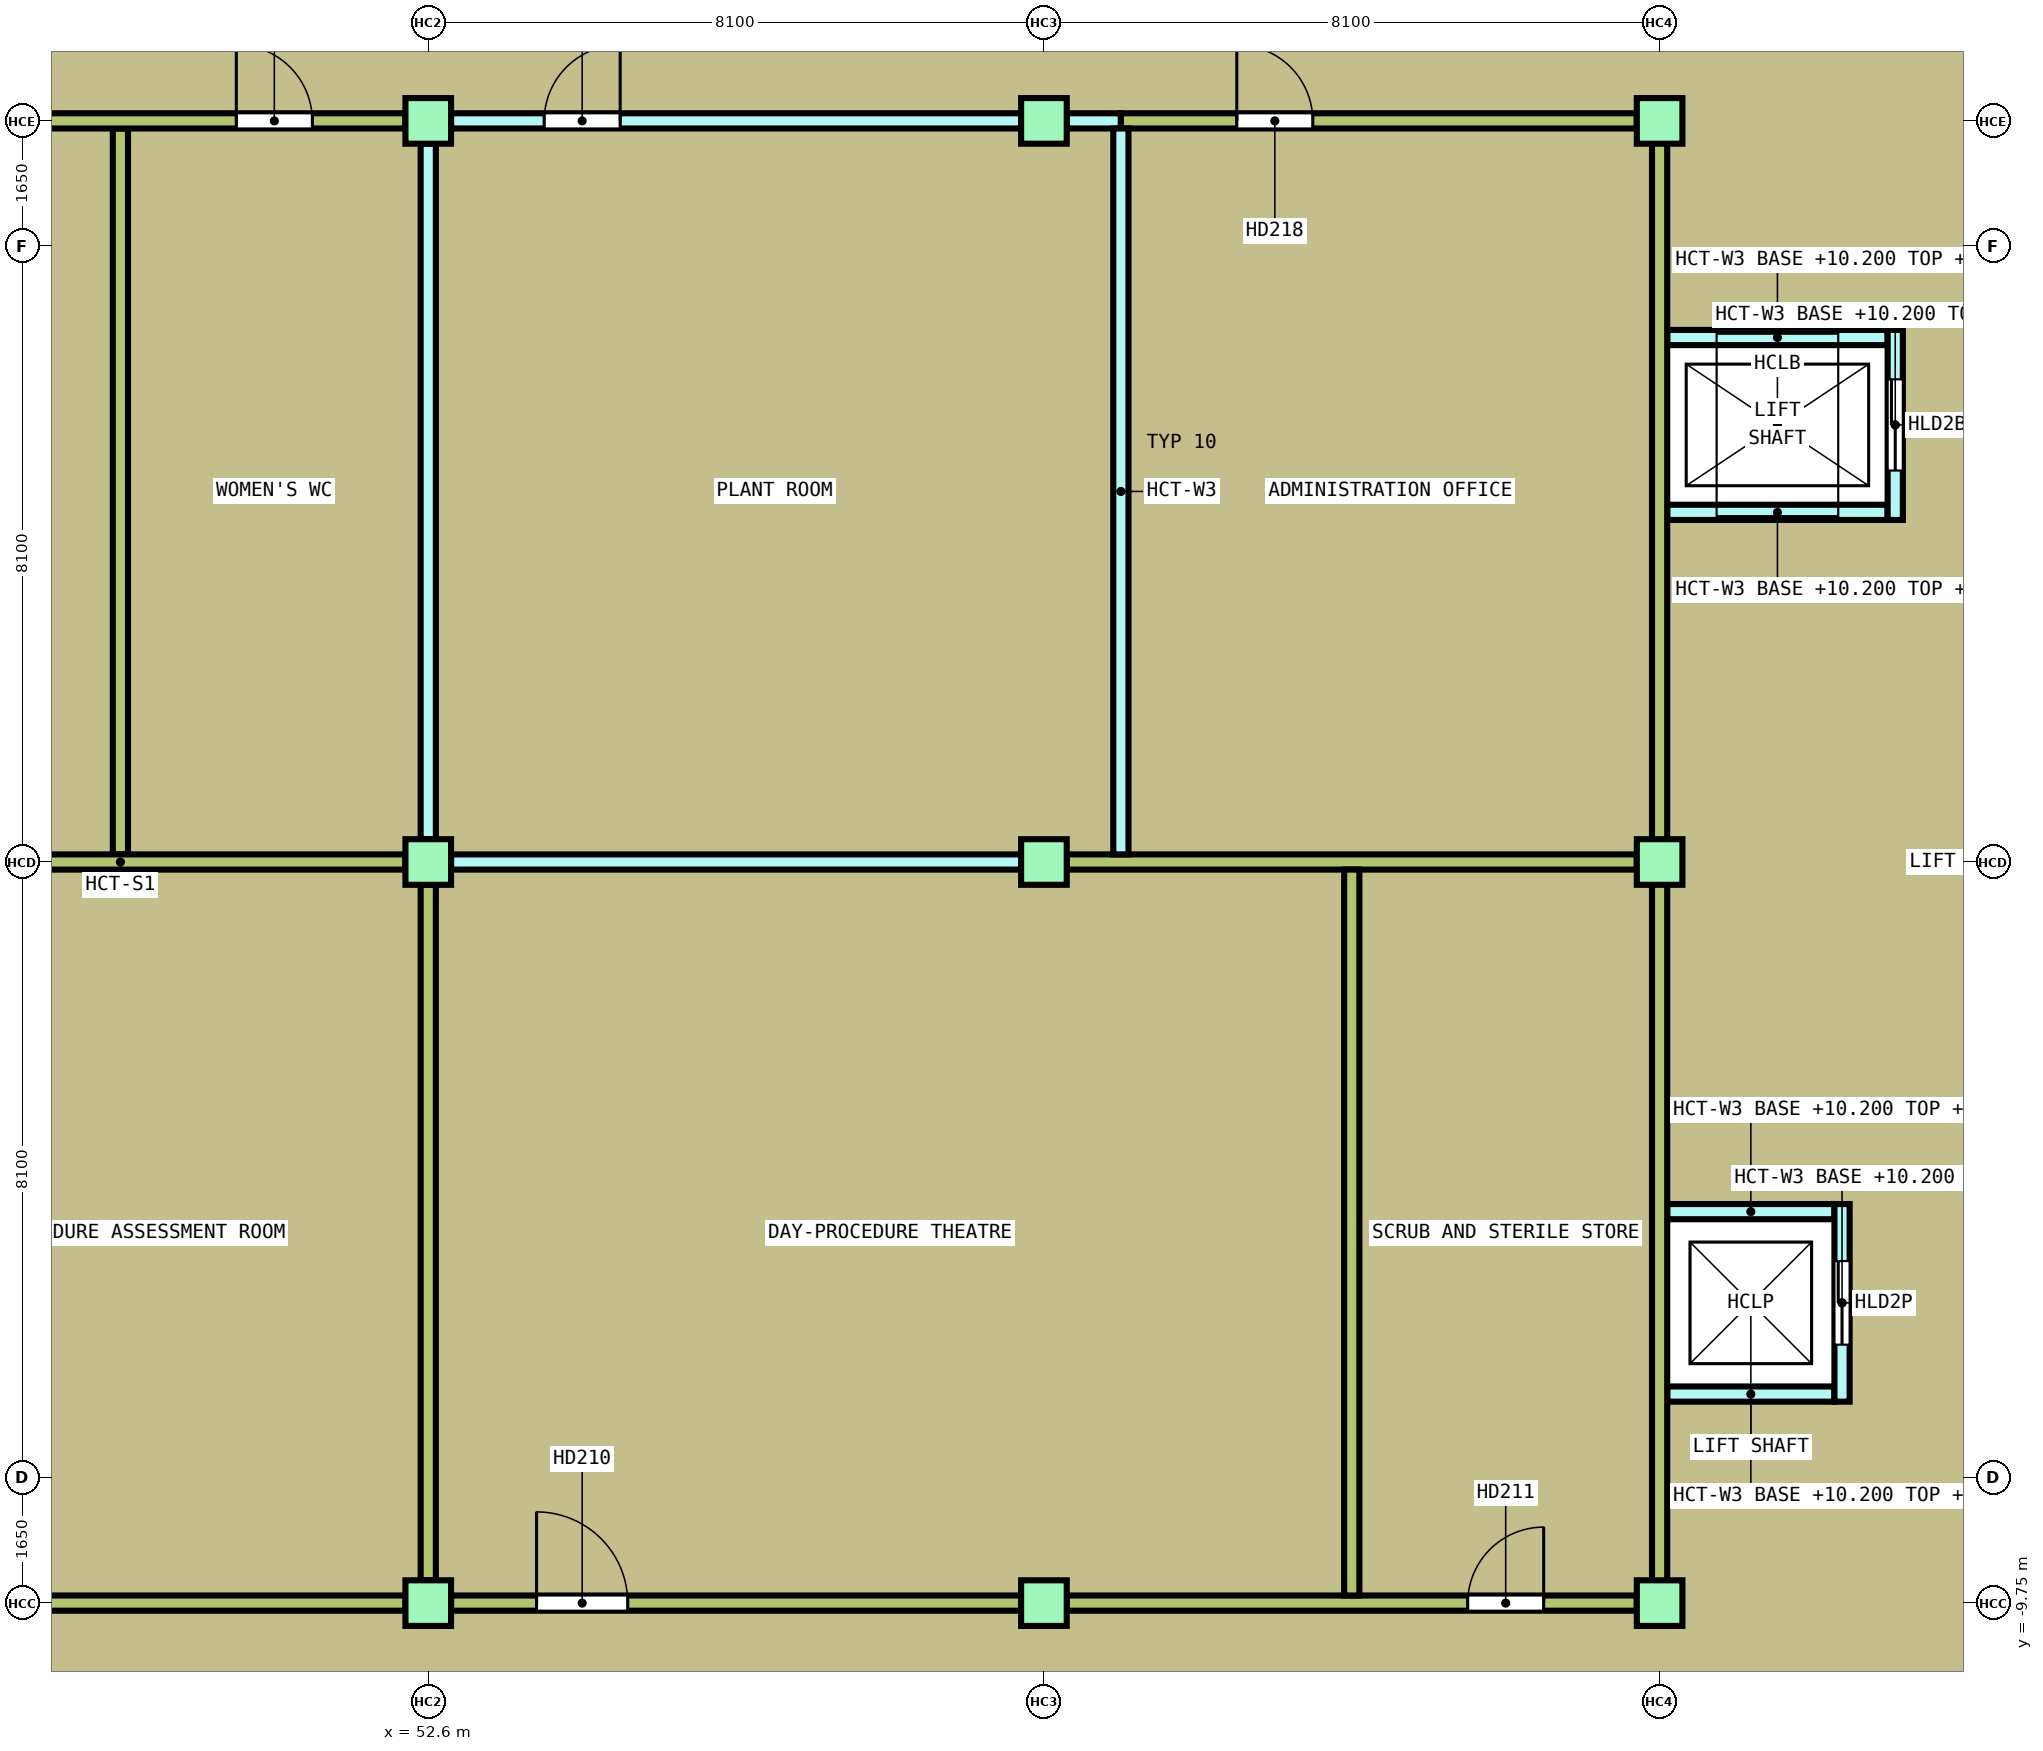
"""IFC4 building model, lengths in metres.
Left out: names, types, materials, properties, quantities, classifications, styles, units other than length and angle.
Written with IfcOpenShell. Run it as: python <this file> out.ifc"""

import sys

from ifc_helpers import new_model, si_unit, direction, frame, frame_2d, origin, origin_2d, place, context, subcontext, project, spatial, rectangle, extrude, element, fill, save


model = new_model("IFC4")
c1 = context("Model", 3, precision=1e-05, world=origin(), true_north=direction((0.0, 1.0)))
c2 = subcontext(c1, "Body", "Model", "MODEL_VIEW")
j1 = project(units=[si_unit("LENGTHUNIT", "METRE"), si_unit("PLANEANGLEUNIT", "RADIAN")], contexts=[c1])
p1 = place(None, origin())
s1 = spatial("IfcSite", under=j1, at=p1, CompositionType="ELEMENT")
p2 = place(p1, origin())
s2 = spatial("IfcBuilding", under=s1, at=p2, CompositionType="ELEMENT")
p3 = place(p2, frame((0.0, 0.0, 10.2)))
s3 = spatial("IfcBuildingStorey", under=s2, at=p3, CompositionType="ELEMENT", Elevation=10.2)
for number, where, z_axis, x_axis in (
    (1, (52.6, -9.75, 0.0), (0.0, 0.0, 1.0), (1.0, 0.0, 0.0)),
    (2, (60.7, -9.75, 0.0), (0.0, 0.0, 1.0), (1.0, 0.0, 0.0)),
    (3, (68.8, -9.75, 0.0), (0.0, 0.0, 1.0), (1.0, 0.0, 0.0)),
    (4, (52.6, 0.0, 0.0), (0.0, 0.0, 1.0), (1.0, 0.0, 0.0)),
    (5, (60.7, 0.0, 0.0), (0.0, 0.0, 1.0), (1.0, 0.0, 0.0)),
    (6, (68.8, 0.0, 0.0), (0.0, 0.0, 1.0), (1.0, 0.0, 0.0)),
    (7, (52.6, 9.75, 0.0), (0.0, 0.0, 1.0), (1.0, 0.0, 0.0)),
    (8, (60.7, 9.75, 0.0), (0.0, 0.0, 1.0), (1.0, 0.0, 0.0)),
    (9, (68.8, 9.75, 0.0), (0.0, 0.0, 1.0), (1.0, 0.0, 0.0)),
):
    element("IfcColumn", number, at=place(p3, frame(where, z_axis=z_axis, x_axis=x_axis)), inside=s3, PredefinedType="COLUMN", context=c2, shape_type="SweptSolid", body=[
        extrude(rectangle(XDim=0.6, YDim=0.6, at=origin_2d()), origin(), (0.0, 0.0, 1.0), 4.15),
    ])
for number, where, z_axis, x_axis in (
    (10, (68.9, -7.0, 0.0), (0.0, 0.0, 1.0), (1.0, 0.0, 0.0)),
    (11, (68.9, -4.6, 0.0), (0.0, 0.0, 1.0), (1.0, 0.0, 0.0)),
):
    element("IfcWall", number, at=place(p3, frame(where, z_axis=z_axis, x_axis=x_axis)), inside=s3, PredefinedType="SOLIDWALL", context=c2, shape_type="SweptSolid", body=[
        extrude(rectangle(XDim=2.2, YDim=0.2, at=frame_2d((1.1, 0.0))), origin(), (0.0, 0.0, 1.0), 4.15),
    ])
p4 = place(p3, frame((71.2, -7.1, 0.0), z_axis=(0.0, 0.0, 1.0), x_axis=(0.0, 1.0, 0.0)))
e12 = element("IfcWall", 12, at=p4, inside=s3, PredefinedType="SOLIDWALL", context=c2, shape_type="SweptSolid", body=[
    extrude(rectangle(XDim=2.6, YDim=0.2, at=frame_2d((1.3, 0.0))), origin(), (0.0, 0.0, 1.0), 4.15),
])
p5 = place(p4, frame((0.75, 0.0, 0.0)))
e13 = element("IfcOpeningElement", 13, at=p5, cuts=e12, PredefinedType="OPENING", context=c2, shape_type="SweptSolid", body=[
    extrude(rectangle(XDim=1.1, YDim=2.1, at=frame_2d((0.55, 1.05))), frame((0.0, 0.11, 0.0), z_axis=(0.0, -1.0, 0.0), x_axis=(1.0, 0.0, 0.0)), (0.0, 0.0, 1.0), 0.22),
])
for number, where, z_axis, x_axis in (
    (14, (68.9, 4.6, 0.0), (0.0, 0.0, 1.0), (1.0, 0.0, 0.0)),
    (15, (68.9, 6.9, 0.0), (0.0, 0.0, 1.0), (1.0, 0.0, 0.0)),
):
    element("IfcWall", number, at=place(p3, frame(where, z_axis=z_axis, x_axis=x_axis)), inside=s3, PredefinedType="SOLIDWALL", context=c2, shape_type="SweptSolid", body=[
        extrude(rectangle(XDim=2.9, YDim=0.2, at=frame_2d((1.45, 0.0))), origin(), (0.0, 0.0, 1.0), 4.15),
    ])
p6 = place(p3, frame((71.9, 4.5, 0.0), z_axis=(0.0, 0.0, 1.0), x_axis=(0.0, 1.0, 0.0)))
e16 = element("IfcWall", 16, at=p6, inside=s3, PredefinedType="SOLIDWALL", context=c2, shape_type="SweptSolid", body=[
    extrude(rectangle(XDim=2.5, YDim=0.2, at=frame_2d((1.25, 0.0))), origin(), (0.0, 0.0, 1.0), 4.15),
])
p7 = place(p6, frame((0.65, 0.0, 0.0)))
e17 = element("IfcOpeningElement", 17, at=p7, cuts=e16, PredefinedType="OPENING", context=c2, shape_type="SweptSolid", body=[
    extrude(rectangle(XDim=1.2, YDim=2.1, at=frame_2d((0.6, 1.05))), frame((0.0, 0.11, 0.0), z_axis=(0.0, -1.0, 0.0), x_axis=(1.0, 0.0, 0.0)), (0.0, 0.0, 1.0), 0.22),
])
p8 = place(p3, frame((48.55, 0.1, 0.0), z_axis=(0.0, 0.0, 1.0), x_axis=(0.0, 1.0, 0.0)))
e18 = element("IfcWall", 18, at=p8, inside=s3, PredefinedType="PARTITIONING", context=c2, shape_type="SweptSolid", body=[
    extrude(rectangle(XDim=9.55, YDim=0.2, at=frame_2d((4.775, 0.0))), origin(), (0.0, 0.0, 1.0), 3.6),
])
p9 = place(p3, frame((68.8, -9.75, 0.0), z_axis=(0.0, 0.0, 1.0), x_axis=(0.0, 1.0, 0.0)))
e19 = element("IfcWall", 19, at=p9, inside=s3, PredefinedType="PARTITIONING", context=c2, shape_type="SweptSolid", body=[
    extrude(rectangle(XDim=19.5, YDim=0.2, at=frame_2d((9.75, 0.0))), origin(), (0.0, 0.0, 1.0), 3.6),
])
p10 = place(p3, frame((44.8, -9.75, 0.0), z_axis=(0.0, 0.0, 1.0), x_axis=(1.0, 0.0, 0.0)))
e20 = element("IfcWall", 20, at=p10, inside=s3, PredefinedType="PARTITIONING", context=c2, shape_type="SweptSolid", body=[
    extrude(rectangle(XDim=7.5, YDim=0.2, at=frame_2d((3.75, 0.0))), origin(), (0.0, 0.0, 1.0), 3.6),
])
p11 = place(p10, frame((1.125, 0.0, 0.0)))
e21 = element("IfcOpeningElement", 21, at=p11, cuts=e20, PredefinedType="OPENING", context=c2, shape_type="SweptSolid", body=[
    extrude(rectangle(XDim=1.2, YDim=2.1, at=frame_2d((0.6, 1.05))), frame((0.0, 0.11, 0.0), z_axis=(0.0, -1.0, 0.0), x_axis=(1.0, 0.0, 0.0)), (0.0, 0.0, 1.0), 0.22),
])
p12 = place(p3, frame((52.9, -9.75, 0.0), z_axis=(0.0, 0.0, 1.0), x_axis=(1.0, 0.0, 0.0)))
e22 = element("IfcWall", 22, at=p12, inside=s3, PredefinedType="PARTITIONING", context=c2, shape_type="SweptSolid", body=[
    extrude(rectangle(XDim=7.5, YDim=0.2, at=frame_2d((3.75, 0.0))), origin(), (0.0, 0.0, 1.0), 3.6),
])
p13 = place(p12, frame((1.125, 0.0, 0.0)))
e23 = element("IfcOpeningElement", 23, at=p13, cuts=e22, PredefinedType="OPENING", context=c2, shape_type="SweptSolid", body=[
    extrude(rectangle(XDim=1.2, YDim=2.1, at=frame_2d((0.6, 1.05))), frame((0.0, 0.11, 0.0), z_axis=(0.0, -1.0, 0.0), x_axis=(1.0, 0.0, 0.0)), (0.0, 0.0, 1.0), 0.22),
])
p14 = place(p3, frame((61.0, -9.75, 0.0), z_axis=(0.0, 0.0, 1.0), x_axis=(1.0, 0.0, 0.0)))
e24 = element("IfcWall", 24, at=p14, inside=s3, PredefinedType="PARTITIONING", context=c2, shape_type="SweptSolid", body=[
    extrude(rectangle(XDim=7.5, YDim=0.2, at=frame_2d((3.75, 0.0))), origin(), (0.0, 0.0, 1.0), 3.6),
])
p15 = place(p14, frame((5.275, 0.0, 0.0)))
e25 = element("IfcOpeningElement", 25, at=p15, cuts=e24, PredefinedType="OPENING", context=c2, shape_type="SweptSolid", body=[
    extrude(rectangle(XDim=1.0, YDim=2.1, at=frame_2d((0.5, 1.05))), frame((0.0, 0.11, 0.0), z_axis=(0.0, -1.0, 0.0), x_axis=(1.0, 0.0, 0.0)), (0.0, 0.0, 1.0), 0.22),
])
p16 = place(p3, frame((44.8, 0.0, 0.0), z_axis=(0.0, 0.0, 1.0), x_axis=(1.0, 0.0, 0.0)))
e26 = element("IfcWall", 26, at=p16, inside=s3, PredefinedType="PARTITIONING", context=c2, shape_type="SweptSolid", body=[
    extrude(rectangle(XDim=7.5, YDim=0.2, at=frame_2d((3.75, 0.0))), origin(), (0.0, 0.0, 1.0), 3.6),
])
p17 = place(p3, frame((52.9, 0.0, 0.0), z_axis=(0.0, 0.0, 1.0), x_axis=(1.0, 0.0, 0.0)))
e27 = element("IfcWall", 27, at=p17, inside=s3, PredefinedType="SOLIDWALL", context=c2, shape_type="SweptSolid", body=[
    extrude(rectangle(XDim=7.5, YDim=0.2, at=frame_2d((3.75, 0.0))), origin(), (0.0, 0.0, 1.0), 3.6),
])
p18 = place(p3, frame((61.0, 0.0, 0.0), z_axis=(0.0, 0.0, 1.0), x_axis=(1.0, 0.0, 0.0)))
e28 = element("IfcWall", 28, at=p18, inside=s3, PredefinedType="PARTITIONING", context=c2, shape_type="SweptSolid", body=[
    extrude(rectangle(XDim=7.5, YDim=0.2, at=frame_2d((3.75, 0.0))), origin(), (0.0, 0.0, 1.0), 3.6),
])
p19 = place(p3, frame((52.6, -9.45, 0.0), z_axis=(0.0, 0.0, 1.0), x_axis=(0.0, 1.0, 0.0)))
e29 = element("IfcWall", 29, at=p19, inside=s3, PredefinedType="PARTITIONING", context=c2, shape_type="SweptSolid", body=[
    extrude(rectangle(XDim=9.15, YDim=0.2, at=frame_2d((4.575, 0.0))), origin(), (0.0, 0.0, 1.0), 3.6),
])
p20 = place(p3, frame((52.6, 0.3, 0.0), z_axis=(0.0, 0.0, 1.0), x_axis=(0.0, 1.0, 0.0)))
e30 = element("IfcWall", 30, at=p20, inside=s3, PredefinedType="SOLIDWALL", context=c2, shape_type="SweptSolid", body=[
    extrude(rectangle(XDim=9.15, YDim=0.2, at=frame_2d((4.575, 0.0))), origin(), (0.0, 0.0, 1.0), 3.6),
])
p21 = place(p3, frame((64.75, -9.65, 0.0), z_axis=(0.0, 0.0, 1.0), x_axis=(0.0, 1.0, 0.0)))
e31 = element("IfcWall", 31, at=p21, inside=s3, PredefinedType="PARTITIONING", context=c2, shape_type="SweptSolid", body=[
    extrude(rectangle(XDim=9.55, YDim=0.2, at=frame_2d((4.775, 0.0))), origin(), (0.0, 0.0, 1.0), 3.6),
])
p22 = place(p3, frame((44.8, 9.75, 0.0), z_axis=(0.0, 0.0, 1.0), x_axis=(1.0, 0.0, 0.0)))
e32 = element("IfcWall", 32, at=p22, inside=s3, PredefinedType="PARTITIONING", context=c2, shape_type="SweptSolid", body=[
    extrude(rectangle(XDim=7.5, YDim=0.2, at=frame_2d((3.75, 0.0))), origin(), (0.0, 0.0, 1.0), 3.6),
])
p23 = place(p22, frame((1.225, 0.0, 0.0)))
e33 = element("IfcOpeningElement", 33, at=p23, cuts=e32, PredefinedType="OPENING", context=c2, shape_type="SweptSolid", body=[
    extrude(rectangle(XDim=1.0, YDim=2.1, at=frame_2d((0.5, 1.05))), frame((0.0, 0.11, 0.0), z_axis=(0.0, -1.0, 0.0), x_axis=(1.0, 0.0, 0.0)), (0.0, 0.0, 1.0), 0.22),
])
p24 = place(p22, frame((5.275, 0.0, 0.0)))
e34 = element("IfcOpeningElement", 34, at=p24, cuts=e32, PredefinedType="OPENING", context=c2, shape_type="SweptSolid", body=[
    extrude(rectangle(XDim=1.0, YDim=2.1, at=frame_2d((0.5, 1.05))), frame((0.0, 0.11, 0.0), z_axis=(0.0, -1.0, 0.0), x_axis=(1.0, 0.0, 0.0)), (0.0, 0.0, 1.0), 0.22),
])
p25 = place(p3, frame((52.9, 9.75, 0.0), z_axis=(0.0, 0.0, 1.0), x_axis=(1.0, 0.0, 0.0)))
e35 = element("IfcWall", 35, at=p25, inside=s3, PredefinedType="SOLIDWALL", context=c2, shape_type="SweptSolid", body=[
    extrude(rectangle(XDim=7.5, YDim=0.2, at=frame_2d((3.75, 0.0))), origin(), (0.0, 0.0, 1.0), 3.6),
])
p26 = place(p25, frame((1.225, 0.0, 0.0)))
e36 = element("IfcOpeningElement", 36, at=p26, cuts=e35, PredefinedType="OPENING", context=c2, shape_type="SweptSolid", body=[
    extrude(rectangle(XDim=1.0, YDim=2.1, at=frame_2d((0.5, 1.05))), frame((0.0, 0.11, 0.0), z_axis=(0.0, -1.0, 0.0), x_axis=(1.0, 0.0, 0.0)), (0.0, 0.0, 1.0), 0.22),
])
p27 = place(p3, frame((61.0, 9.75, 0.0), z_axis=(0.0, 0.0, 1.0), x_axis=(1.0, 0.0, 0.0)))
e37 = element("IfcWall", 37, at=p27, inside=s3, PredefinedType="SOLIDWALL", context=c2, shape_type="SweptSolid", body=[
    extrude(rectangle(XDim=0.712, YDim=0.2, at=frame_2d((0.356, 0.0))), origin(), (0.0, 0.0, 1.0), 3.6),
])
p28 = place(p3, frame((61.712, 9.75, 0.0), z_axis=(0.0, 0.0, 1.0), x_axis=(1.0, 0.0, 0.0)))
e38 = element("IfcWall", 38, at=p28, inside=s3, PredefinedType="PARTITIONING", context=c2, shape_type="SweptSolid", body=[
    extrude(rectangle(XDim=6.788, YDim=0.2, at=frame_2d((3.394, 0.0))), origin(), (0.0, 0.0, 1.0), 3.6),
])
p29 = place(p28, frame((1.525, 0.0, 0.0)))
e39 = element("IfcOpeningElement", 39, at=p29, cuts=e38, PredefinedType="OPENING", context=c2, shape_type="SweptSolid", body=[
    extrude(rectangle(XDim=1.0, YDim=2.1, at=frame_2d((0.5, 1.05))), frame((0.0, 0.11, 0.0), z_axis=(0.0, -1.0, 0.0), x_axis=(1.0, 0.0, 0.0)), (0.0, 0.0, 1.0), 0.22),
])
p30 = place(p3, frame((61.712, 0.1, 0.0), z_axis=(0.0, 0.0, 1.0), x_axis=(0.0, 1.0, 0.0)))
e40 = element("IfcWall", 40, at=p30, inside=s3, PredefinedType="SOLIDWALL", context=c2, shape_type="SweptSolid", body=[
    extrude(rectangle(XDim=9.55, YDim=0.2, at=frame_2d((4.775, 0.0))), origin(), (0.0, 0.0, 1.0), 3.6),
])
p31 = place(p5, origin())
e41 = element("IfcDoor", 41, at=p31, inside=s3, OperationType="SLIDING_TO_LEFT", PredefinedType="DOOR", context=c2, shape_type="SweptSolid", body=[
    extrude(rectangle(XDim=1.1, YDim=2.1, at=frame_2d((0.55, 1.05))), frame((0.0, 0.025, 0.0), z_axis=(0.0, -1.0, 0.0), x_axis=(1.0, 0.0, 0.0)), (0.0, 0.0, 1.0), 0.05),
])
fill(e13, e41)
p32 = place(p7, origin())
e42 = element("IfcDoor", 42, at=p32, inside=s3, OperationType="SLIDING_TO_LEFT", PredefinedType="DOOR", context=c2, shape_type="SweptSolid", body=[
    extrude(rectangle(XDim=1.2, YDim=2.1, at=frame_2d((0.6, 1.05))), frame((0.0, 0.025, 0.0), z_axis=(0.0, -1.0, 0.0), x_axis=(1.0, 0.0, 0.0)), (0.0, 0.0, 1.0), 0.05),
])
fill(e17, e42)
p33 = place(p13, origin())
e43 = element("IfcDoor", 43, at=p33, inside=s3, OperationType="SINGLE_SWING_RIGHT", PredefinedType="DOOR", context=c2, shape_type="SweptSolid", body=[
    extrude(rectangle(XDim=1.2, YDim=2.1, at=frame_2d((0.6, 1.05))), frame((0.0, 0.025, 0.0), z_axis=(0.0, -1.0, 0.0), x_axis=(1.0, 0.0, 0.0)), (0.0, 0.0, 1.0), 0.05),
])
fill(e23, e43)
p34 = place(p15, origin())
e44 = element("IfcDoor", 44, at=p34, inside=s3, OperationType="SINGLE_SWING_LEFT", PredefinedType="DOOR", context=c2, shape_type="SweptSolid", body=[
    extrude(rectangle(XDim=1.0, YDim=2.1, at=frame_2d((0.5, 1.05))), frame((0.0, 0.025, 0.0), z_axis=(0.0, -1.0, 0.0), x_axis=(1.0, 0.0, 0.0)), (0.0, 0.0, 1.0), 0.05),
])
fill(e25, e44)
p35 = place(p24, origin())
e45 = element("IfcDoor", 45, at=p35, inside=s3, OperationType="SINGLE_SWING_RIGHT", PredefinedType="DOOR", context=c2, shape_type="SweptSolid", body=[
    extrude(rectangle(XDim=1.0, YDim=2.1, at=frame_2d((0.5, 1.05))), frame((0.0, 0.025, 0.0), z_axis=(0.0, -1.0, 0.0), x_axis=(1.0, 0.0, 0.0)), (0.0, 0.0, 1.0), 0.05),
])
fill(e34, e45)
p36 = place(p26, origin())
e46 = element("IfcDoor", 46, at=p36, inside=s3, OperationType="SINGLE_SWING_LEFT", PredefinedType="DOOR", context=c2, shape_type="SweptSolid", body=[
    extrude(rectangle(XDim=1.0, YDim=2.1, at=frame_2d((0.5, 1.05))), frame((0.0, 0.025, 0.0), z_axis=(0.0, -1.0, 0.0), x_axis=(1.0, 0.0, 0.0)), (0.0, 0.0, 1.0), 0.05),
])
fill(e36, e46)
p37 = place(p29, origin())
e47 = element("IfcDoor", 47, at=p37, inside=s3, OperationType="SINGLE_SWING_RIGHT", PredefinedType="DOOR", context=c2, shape_type="SweptSolid", body=[
    extrude(rectangle(XDim=1.0, YDim=2.1, at=frame_2d((0.5, 1.05))), frame((0.0, 0.025, 0.0), z_axis=(0.0, -1.0, 0.0), x_axis=(1.0, 0.0, 0.0)), (0.0, 0.0, 1.0), 0.05),
])
fill(e39, e47)
save(model, sys.argv[1])
